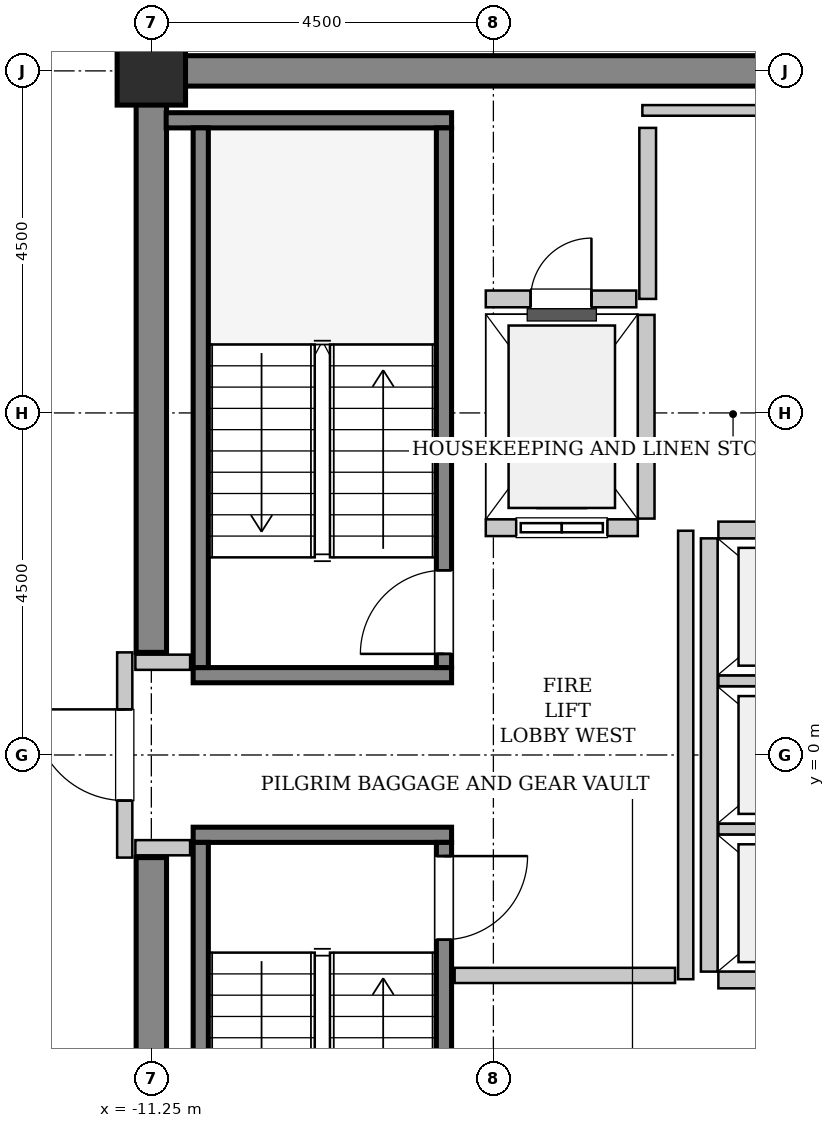
"""IFC4 building model, lengths in metres.
Left out: names, types, materials, properties, quantities, classifications, styles, units other than length and angle.
Written with IfcOpenShell. Run it as: python <this file> out.ifc"""

import sys

from ifc_helpers import new_model, si_unit, direction, frame, frame_2d, origin, origin_2d, place, context, subcontext, project, spatial, rectangle, extrude, source, transform, mapped, element, fill, save


model = new_model("IFC4")
c1 = context("Model", 3, precision=1e-05, world=origin(), true_north=direction((0.0, 1.0)))
c2 = subcontext(c1, "Body", "Model", "MODEL_VIEW")
j1 = project(units=[si_unit("LENGTHUNIT", "METRE"), si_unit("PLANEANGLEUNIT", "RADIAN")], contexts=[c1])
p1 = place(None, origin())
s1 = spatial("IfcSite", under=j1, at=p1, CompositionType="ELEMENT")
p2 = place(p1, origin())
s2 = spatial("IfcBuilding", under=s1, at=p2, CompositionType="ELEMENT")
p3 = place(p2, frame((0.0, 0.0, 322.4)))
s3 = spatial("IfcBuildingStorey", under=s2, at=p3, CompositionType="ELEMENT", Elevation=322.4)
m1 = source(origin(), c2, "Body", "SweptSolid", [
    extrude(rectangle(XDim=9.9, YDim=0.4, at=frame_2d((4.95, 0.0))), origin(), (0.0, 0.0, 1.0), 3.8),
])
p4 = place(p3, frame((-11.45, 9.0, 0.0), z_axis=(0.0, 0.0, 1.0), x_axis=(1.0, 0.0, 0.0)))
e1 = element("IfcWall", 1, at=p4, inside=s3, PredefinedType="SHEAR", context=c2, shape_type="MappedRepresentation", body=[
    mapped(m1, transform((0.0, 0.0, 0.0), x_axis=(1.0, 0.0, 0.0), y_axis=(0.0, 1.0, 0.0), z_axis=(0.0, 0.0, 1.0), scale=1.0)),
])
m2 = source(origin(), c2, "Body", "SweptSolid", [
    extrude(rectangle(XDim=7.45, YDim=0.4, at=frame_2d((3.725, 0.0))), origin(), (0.0, 0.0, 1.0), 3.8),
])
for number, where, z_axis, x_axis in (
    (2, (-11.25, -8.8, 0.0), (0.0, 0.0, 1.0), (0.0, 1.0, 0.0)),
    (3, (-11.25, 1.35, 0.0), (0.0, 0.0, 1.0), (0.0, 1.0, 0.0)),
):
    element("IfcWall", number, at=place(p3, frame(where, z_axis=z_axis, x_axis=x_axis)), inside=s3, PredefinedType="SHEAR", context=c2, shape_type="MappedRepresentation", body=[
        mapped(m2, transform((0.0, 0.0, 0.0), x_axis=(1.0, 0.0, 0.0), y_axis=(0.0, 1.0, 0.0), z_axis=(0.0, 0.0, 1.0), scale=1.0)),
    ])
m3 = source(origin(), c2, "Body", "SweptSolid", [
    extrude(rectangle(XDim=0.9, YDim=0.9, at=origin_2d()), origin(), (0.0, 0.0, 1.0), 3.8),
])
p5 = place(p3, frame((-11.25, 9.0, 0.0), z_axis=(0.0, 0.0, 1.0), x_axis=(1.0, 0.0, 0.0)))
e4 = element("IfcColumn", 4, at=p5, inside=s3, PredefinedType="COLUMN", context=c2, shape_type="MappedRepresentation", body=[
    mapped(m3, transform((0.0, 0.0, 0.0), x_axis=(1.0, 0.0, 0.0), y_axis=(0.0, 1.0, 0.0), z_axis=(0.0, 0.0, 1.0), scale=1.0)),
])
m4 = source(origin(), c2, "Body", "SweptSolid", [
    extrude(rectangle(XDim=3.4, YDim=0.2, at=frame_2d((1.7, 0.0))), origin(), (0.0, 0.0, 1.0), 3.8),
])
p6 = place(p3, frame((-7.3, 1.05, 0.0), z_axis=(0.0, 0.0, 1.0), x_axis=(-1.0, 0.0, 0.0)))
e5 = element("IfcWall", 5, at=p6, inside=s3, PredefinedType="SOLIDWALL", context=c2, shape_type="MappedRepresentation", body=[
    mapped(m4, transform((0.0, 0.0, 0.0), x_axis=(1.0, 0.0, 0.0), y_axis=(0.0, 1.0, 0.0), z_axis=(0.0, 0.0, 1.0), scale=1.0)),
])
m5 = source(origin(), c2, "Body", "SweptSolid", [
    extrude(rectangle(XDim=3.755, YDim=0.2, at=frame_2d((1.877, 0.0))), origin(), (0.0, 0.0, 1.0), 3.8),
])
p7 = place(p3, frame((-7.3, 8.35, 0.0), z_axis=(0.0, 0.0, 1.0), x_axis=(-1.0, 0.0, 0.0)))
e6 = element("IfcWall", 6, at=p7, inside=s3, PredefinedType="SOLIDWALL", context=c2, shape_type="MappedRepresentation", body=[
    mapped(m5, transform((0.0, 0.0, 0.0), x_axis=(1.0, 0.0, 0.0), y_axis=(0.0, 1.0, 0.0), z_axis=(0.0, 0.0, 1.0), scale=1.0)),
])
m6 = source(origin(), c2, "Body", "SweptSolid", [
    extrude(rectangle(XDim=7.1, YDim=0.2, at=frame_2d((3.55, 0.0))), origin(), (0.0, 0.0, 1.0), 3.8),
])
p8 = place(p3, frame((-7.4, 1.15, 0.0), z_axis=(0.0, 0.0, 1.0), x_axis=(0.0, 1.0, 0.0)))
e7 = element("IfcWall", 7, at=p8, inside=s3, PredefinedType="SOLIDWALL", context=c2, shape_type="MappedRepresentation", body=[
    mapped(m6, transform((0.0, 0.0, 0.0), x_axis=(1.0, 0.0, 0.0), y_axis=(0.0, 1.0, 0.0), z_axis=(0.0, 0.0, 1.0), scale=1.0)),
])
p9 = place(p8, frame((0.18, 0.0, 0.0)))
e8 = element("IfcOpeningElement", 8, at=p9, cuts=e7, PredefinedType="OPENING", context=c2, shape_type="SweptSolid", body=[
    extrude(rectangle(XDim=1.1, YDim=2.15, at=frame_2d((0.55, 1.075))), frame((0.0, 0.11, 0.0), z_axis=(0.0, -1.0, 0.0), x_axis=(1.0, 0.0, 0.0)), (0.0, 0.0, 1.0), 0.22),
])
p10 = place(p3, frame((-10.6, 1.15, 0.0), z_axis=(0.0, 0.0, 1.0), x_axis=(0.0, 1.0, 0.0)))
e9 = element("IfcWall", 9, at=p10, inside=s3, PredefinedType="SOLIDWALL", context=c2, shape_type="MappedRepresentation", body=[
    mapped(m6, transform((0.0, 0.0, 0.0), x_axis=(1.0, 0.0, 0.0), y_axis=(0.0, 1.0, 0.0), z_axis=(0.0, 0.0, 1.0), scale=1.0)),
])
p11 = place(p3, frame((-10.7, -1.05, 0.0), z_axis=(0.0, 0.0, 1.0), x_axis=(1.0, 0.0, 0.0)))
e10 = element("IfcWall", 10, at=p11, inside=s3, PredefinedType="SOLIDWALL", context=c2, shape_type="MappedRepresentation", body=[
    mapped(m4, transform((0.0, 0.0, 0.0), x_axis=(1.0, 0.0, 0.0), y_axis=(0.0, 1.0, 0.0), z_axis=(0.0, 0.0, 1.0), scale=1.0)),
])
p12 = place(p3, frame((-10.6, -1.15, 0.0), z_axis=(0.0, 0.0, 1.0), x_axis=(0.0, -1.0, 0.0)))
e11 = element("IfcWall", 11, at=p12, inside=s3, PredefinedType="SOLIDWALL", context=c2, shape_type="MappedRepresentation", body=[
    mapped(m6, transform((0.0, 0.0, 0.0), x_axis=(1.0, 0.0, 0.0), y_axis=(0.0, 1.0, 0.0), z_axis=(0.0, 0.0, 1.0), scale=1.0)),
])
p13 = place(p3, frame((-7.4, -1.15, 0.0), z_axis=(0.0, 0.0, 1.0), x_axis=(0.0, -1.0, 0.0)))
e12 = element("IfcWall", 12, at=p13, inside=s3, PredefinedType="SOLIDWALL", context=c2, shape_type="MappedRepresentation", body=[
    mapped(m6, transform((0.0, 0.0, 0.0), x_axis=(1.0, 0.0, 0.0), y_axis=(0.0, 1.0, 0.0), z_axis=(0.0, 0.0, 1.0), scale=1.0)),
])
p14 = place(p13, frame((0.18, 0.0, 0.0)))
e13 = element("IfcOpeningElement", 13, at=p14, cuts=e12, PredefinedType="OPENING", context=c2, shape_type="SweptSolid", body=[
    extrude(rectangle(XDim=1.1, YDim=2.15, at=frame_2d((0.55, 1.075))), frame((0.0, 0.11, 0.0), z_axis=(0.0, -1.0, 0.0), x_axis=(1.0, 0.0, 0.0)), (0.0, 0.0, 1.0), 0.22),
])
m7 = source(origin(), c2, "Body", "SweptSolid", [
    extrude(rectangle(XDim=2.0, YDim=0.22, at=frame_2d((1.0, 0.0))), origin(), (0.0, 0.0, 1.0), 3.535),
])
p15 = place(p3, frame((-6.85, 2.99, 0.0), z_axis=(0.0, 0.0, 1.0), x_axis=(1.0, 0.0, 0.0)))
e14 = element("IfcWall", 14, at=p15, inside=s3, PredefinedType="SOLIDWALL", context=c2, shape_type="MappedRepresentation", body=[
    mapped(m7, transform((0.0, 0.0, 0.0), x_axis=(1.0, 0.0, 0.0), y_axis=(0.0, 1.0, 0.0), z_axis=(0.0, 0.0, 1.0), scale=1.0)),
])
p16 = place(p15, frame((0.4, 0.0, 0.0)))
e15 = element("IfcOpeningElement", 15, at=p16, cuts=e14, PredefinedType="OPENING", context=c2, shape_type="SweptSolid", body=[
    extrude(rectangle(XDim=1.2, YDim=2.2, at=frame_2d((0.6, 1.1))), frame((0.0, 0.12, 0.0), z_axis=(0.0, -1.0, 0.0), x_axis=(1.0, 0.0, 0.0)), (0.0, 0.0, 1.0), 0.24),
])
m8 = source(origin(), c2, "Body", "SweptSolid", [
    extrude(rectangle(XDim=2.68, YDim=0.22, at=frame_2d((1.34, 0.0))), origin(), (0.0, 0.0, 1.0), 3.535),
])
p17 = place(p3, frame((-4.74, 3.11, 0.0), z_axis=(0.0, 0.0, 1.0), x_axis=(0.0, 1.0, 0.0)))
e16 = element("IfcWall", 16, at=p17, inside=s3, PredefinedType="SOLIDWALL", context=c2, shape_type="MappedRepresentation", body=[
    mapped(m8, transform((0.0, 0.0, 0.0), x_axis=(1.0, 0.0, 0.0), y_axis=(0.0, 1.0, 0.0), z_axis=(0.0, 0.0, 1.0), scale=1.0)),
])
m9 = source(origin(), c2, "Body", "SweptSolid", [
    extrude(rectangle(XDim=5.7, YDim=0.22, at=frame_2d((2.85, 0.0))), origin(), (0.0, 0.0, 1.0), 3.535),
])
p18 = place(p3, frame((-3.91, 2.85, 0.0), z_axis=(0.0, 0.0, 1.0), x_axis=(0.0, -1.0, 0.0)))
e17 = element("IfcWall", 17, at=p18, inside=s3, PredefinedType="SOLIDWALL", context=c2, shape_type="MappedRepresentation", body=[
    mapped(m9, transform((0.0, 0.0, 0.0), x_axis=(1.0, 0.0, 0.0), y_axis=(0.0, 1.0, 0.0), z_axis=(0.0, 0.0, 1.0), scale=1.0)),
])
m10 = source(origin(), c2, "Body", "SweptSolid", [
    extrude(rectangle(XDim=2.13, YDim=0.22, at=frame_2d((1.065, 0.0))), origin(), (0.0, 0.0, 1.0), 3.535),
])
p19 = place(p3, frame((-3.79, -2.96, 0.0), z_axis=(0.0, 0.0, 1.0), x_axis=(1.0, 0.0, 0.0)))
e18 = element("IfcWall", 18, at=p19, inside=s3, PredefinedType="SOLIDWALL", context=c2, shape_type="MappedRepresentation", body=[
    mapped(m10, transform((0.0, 0.0, 0.0), x_axis=(1.0, 0.0, 0.0), y_axis=(0.0, 1.0, 0.0), z_axis=(0.0, 0.0, 1.0), scale=1.0)),
])
m11 = source(origin(), c2, "Body", "SweptSolid", [
    extrude(rectangle(XDim=2.13, YDim=0.14, at=frame_2d((1.065, 0.0))), origin(), (0.0, 0.0, 1.0), 3.535),
])
for number, where, z_axis, x_axis in (
    (19, (-3.79, -0.975, 0.0), (0.0, 0.0, 1.0), (1.0, 0.0, 0.0)),
    (20, (-3.79, 0.975, 0.0), (0.0, 0.0, 1.0), (1.0, 0.0, 0.0)),
):
    element("IfcWall", number, at=place(p3, frame(where, z_axis=z_axis, x_axis=x_axis)), inside=s3, PredefinedType="PARTITIONING", context=c2, shape_type="MappedRepresentation", body=[
        mapped(m11, transform((0.0, 0.0, 0.0), x_axis=(1.0, 0.0, 0.0), y_axis=(0.0, 1.0, 0.0), z_axis=(0.0, 0.0, 1.0), scale=1.0)),
    ])
p20 = place(p3, frame((-1.66, 2.96, 0.0), z_axis=(0.0, 0.0, 1.0), x_axis=(-1.0, 0.0, 0.0)))
e21 = element("IfcWall", 21, at=p20, inside=s3, PredefinedType="SOLIDWALL", context=c2, shape_type="MappedRepresentation", body=[
    mapped(m10, transform((0.0, 0.0, 0.0), x_axis=(1.0, 0.0, 0.0), y_axis=(0.0, 1.0, 0.0), z_axis=(0.0, 0.0, 1.0), scale=1.0)),
])
m12 = source(origin(), c2, "Body", "SweptSolid", [
    extrude(rectangle(XDim=2.25, YDim=0.22, at=frame_2d((1.125, 0.0))), origin(), (0.0, 0.0, 1.0), 3.535),
])
p21 = place(p3, frame((-4.72, 6.0, 0.0), z_axis=(0.0, 0.0, 1.0), x_axis=(0.0, 1.0, 0.0)))
e22 = element("IfcWall", 22, at=p21, inside=s3, PredefinedType="SOLIDWALL", context=c2, shape_type="MappedRepresentation", body=[
    mapped(m12, transform((0.0, 0.0, 0.0), x_axis=(1.0, 0.0, 0.0), y_axis=(0.0, 1.0, 0.0), z_axis=(0.0, 0.0, 1.0), scale=1.0)),
])
m13 = source(origin(), c2, "Body", "SweptSolid", [
    extrude(rectangle(XDim=1.98, YDim=0.22, at=frame_2d((0.99, 0.0))), origin(), (0.0, 0.0, 1.0), 3.535),
])
p22 = place(p3, frame((-6.85, 6.0, 0.0), z_axis=(0.0, 0.0, 1.0), x_axis=(1.0, 0.0, 0.0)))
e23 = element("IfcWall", 23, at=p22, inside=s3, PredefinedType="SOLIDWALL", context=c2, shape_type="MappedRepresentation", body=[
    mapped(m13, transform((0.0, 0.0, 0.0), x_axis=(1.0, 0.0, 0.0), y_axis=(0.0, 1.0, 0.0), z_axis=(0.0, 0.0, 1.0), scale=1.0)),
])
p23 = place(p22, frame((0.59, 0.0, 0.0)))
e24 = element("IfcOpeningElement", 24, at=p23, cuts=e23, PredefinedType="OPENING", context=c2, shape_type="SweptSolid", body=[
    extrude(rectangle(XDim=0.8, YDim=2.0, at=frame_2d((0.4, 1.0))), frame((0.0, 0.12, 0.0), z_axis=(0.0, -1.0, 0.0), x_axis=(1.0, 0.0, 0.0)), (0.0, 0.0, 1.0), 0.24),
])
m14 = source(origin(), c2, "Body", "SweptSolid", [
    extrude(rectangle(XDim=2.7, YDim=0.2, at=frame_2d((1.35, 0.0))), origin(), (0.0, 0.0, 1.0), 2.625),
])
p24 = place(p3, frame((-11.6, -1.35, 0.0), z_axis=(0.0, 0.0, 1.0), x_axis=(0.0, 1.0, 0.0)))
e25 = element("IfcWall", 25, at=p24, inside=s3, PredefinedType="PARTITIONING", context=c2, shape_type="MappedRepresentation", body=[
    mapped(m14, transform((0.0, 0.0, 0.0), x_axis=(1.0, 0.0, 0.0), y_axis=(0.0, 1.0, 0.0), z_axis=(0.0, 0.0, 1.0), scale=1.0)),
])
p25 = place(p24, frame((0.75, 0.0, 0.0)))
e26 = element("IfcOpeningElement", 26, at=p25, cuts=e25, PredefinedType="OPENING", context=c2, shape_type="SweptSolid", body=[
    extrude(rectangle(XDim=1.2, YDim=2.15, at=frame_2d((0.6, 1.075))), frame((0.0, 0.11, 0.0), z_axis=(0.0, -1.0, 0.0), x_axis=(1.0, 0.0, 0.0)), (0.0, 0.0, 1.0), 0.22),
])
m15 = source(origin(), c2, "Body", "SweptSolid", [
    extrude(rectangle(XDim=5.9, YDim=0.2, at=frame_2d((2.95, 0.0))), origin(), (0.0, 0.0, 1.0), 3.535),
])
p26 = place(p3, frame((-4.22, -2.95, 0.0), z_axis=(0.0, 0.0, 1.0), x_axis=(0.0, 1.0, 0.0)))
e27 = element("IfcWall", 27, at=p26, inside=s3, PredefinedType="PARTITIONING", context=c2, shape_type="MappedRepresentation", body=[
    mapped(m15, transform((0.0, 0.0, 0.0), x_axis=(1.0, 0.0, 0.0), y_axis=(0.0, 1.0, 0.0), z_axis=(0.0, 0.0, 1.0), scale=1.0)),
])
m16 = source(origin(), c2, "Body", "SweptSolid", [
    extrude(rectangle(XDim=2.9, YDim=0.2, at=frame_2d((1.45, 0.0))), origin(), (0.0, 0.0, 1.0), 3.535),
])
p27 = place(p3, frame((-7.26, -2.9, 0.0), z_axis=(0.0, 0.0, 1.0), x_axis=(1.0, 0.0, 0.0)))
e28 = element("IfcWall", 28, at=p27, inside=s3, PredefinedType="PARTITIONING", context=c2, shape_type="MappedRepresentation", body=[
    mapped(m16, transform((0.0, 0.0, 0.0), x_axis=(1.0, 0.0, 0.0), y_axis=(0.0, 1.0, 0.0), z_axis=(0.0, 0.0, 1.0), scale=1.0)),
])
m17 = source(origin(), c2, "Body", "SweptSolid", [
    extrude(rectangle(XDim=0.72, YDim=0.2, at=frame_2d((0.36, 0.0))), origin(), (0.0, 0.0, 1.0), 3.535),
])
for number, where, z_axis, x_axis in (
    (29, (-11.46, 1.22, 0.0), (0.0, 0.0, 1.0), (1.0, 0.0, 0.0)),
    (30, (-11.46, -1.22, 0.0), (0.0, 0.0, 1.0), (1.0, 0.0, 0.0)),
):
    element("IfcWall", number, at=place(p3, frame(where, z_axis=z_axis, x_axis=x_axis)), inside=s3, PredefinedType="PARTITIONING", context=c2, shape_type="MappedRepresentation", body=[
        mapped(m17, transform((0.0, 0.0, 0.0), x_axis=(1.0, 0.0, 0.0), y_axis=(0.0, 1.0, 0.0), z_axis=(0.0, 0.0, 1.0), scale=1.0)),
    ])
m18 = source(origin(), c2, "Body", "SweptSolid", [
    extrude(rectangle(XDim=3.15, YDim=0.14, at=frame_2d((1.575, 0.0))), origin(), (0.0, 0.0, 1.0), 3.535),
])
p28 = place(p3, frame((-4.79, 8.48, 0.0), z_axis=(0.0, 0.0, 1.0), x_axis=(1.0, 0.0, 0.0)))
e31 = element("IfcWall", 31, at=p28, inside=s3, PredefinedType="PARTITIONING", context=c2, shape_type="MappedRepresentation", body=[
    mapped(m18, transform((0.0, 0.0, 0.0), x_axis=(1.0, 0.0, 0.0), y_axis=(0.0, 1.0, 0.0), z_axis=(0.0, 0.0, 1.0), scale=1.0)),
])
m19 = source(origin(), c2, "Body", "SweptSolid", [
    extrude(rectangle(XDim=1.1, YDim=2.15, at=frame_2d((0.55, 1.075))), frame((0.0, 0.025, 0.0), z_axis=(0.0, -1.0, 0.0), x_axis=(1.0, 0.0, 0.0)), (0.0, 0.0, 1.0), 0.05),
])
p29 = place(p9, origin())
e32 = element("IfcDoor", 32, at=p29, inside=s3, OperationType="SINGLE_SWING_LEFT", PredefinedType="DOOR", context=c2, shape_type="MappedRepresentation", body=[
    mapped(m19, transform((0.0, 0.0, 0.0), x_axis=(1.0, 0.0, 0.0), y_axis=(0.0, 1.0, 0.0), z_axis=(0.0, 0.0, 1.0), scale=1.0)),
])
fill(e8, e32)
p30 = place(p14, origin())
e33 = element("IfcDoor", 33, at=p30, inside=s3, OperationType="SINGLE_SWING_LEFT", PredefinedType="DOOR", context=c2, shape_type="MappedRepresentation", body=[
    mapped(m19, transform((0.0, 0.0, 0.0), x_axis=(1.0, 0.0, 0.0), y_axis=(0.0, 1.0, 0.0), z_axis=(0.0, 0.0, 1.0), scale=1.0)),
])
fill(e13, e33)
m20 = source(origin(), c2, "Body", "SweptSolid", [
    extrude(rectangle(XDim=1.2, YDim=2.2, at=frame_2d((0.6, 1.1))), frame((0.0, 0.025, 0.0), z_axis=(0.0, -1.0, 0.0), x_axis=(1.0, 0.0, 0.0)), (0.0, 0.0, 1.0), 0.05),
])
p31 = place(p16, origin())
e34 = element("IfcDoor", 34, at=p31, inside=s3, OperationType="SLIDING_TO_LEFT", PredefinedType="DOOR", context=c2, shape_type="MappedRepresentation", body=[
    mapped(m20, transform((0.0, 0.0, 0.0), x_axis=(1.0, 0.0, 0.0), y_axis=(0.0, 1.0, 0.0), z_axis=(0.0, 0.0, 1.0), scale=1.0)),
])
fill(e15, e34)
m21 = source(origin(), c2, "Body", "SweptSolid", [
    extrude(rectangle(XDim=0.8, YDim=2.0, at=frame_2d((0.4, 1.0))), frame((0.0, 0.025, 0.0), z_axis=(0.0, -1.0, 0.0), x_axis=(1.0, 0.0, 0.0)), (0.0, 0.0, 1.0), 0.05),
])
p32 = place(p23, origin())
e35 = element("IfcDoor", 35, at=p32, inside=s3, OperationType="SINGLE_SWING_RIGHT", PredefinedType="TRAPDOOR", context=c2, shape_type="MappedRepresentation", body=[
    mapped(m21, transform((0.0, 0.0, 0.0), x_axis=(1.0, 0.0, 0.0), y_axis=(0.0, 1.0, 0.0), z_axis=(0.0, 0.0, 1.0), scale=1.0)),
])
fill(e24, e35)
m22 = source(origin(), c2, "Body", "SweptSolid", [
    extrude(rectangle(XDim=1.2, YDim=2.15, at=frame_2d((0.6, 1.075))), frame((0.0, 0.025, 0.0), z_axis=(0.0, -1.0, 0.0), x_axis=(1.0, 0.0, 0.0)), (0.0, 0.0, 1.0), 0.05),
])
p33 = place(p25, origin())
e36 = element("IfcDoor", 36, at=p33, inside=s3, OperationType="SINGLE_SWING_RIGHT", PredefinedType="DOOR", context=c2, shape_type="MappedRepresentation", body=[
    mapped(m22, transform((0.0, 0.0, 0.0), x_axis=(1.0, 0.0, 0.0), y_axis=(0.0, 1.0, 0.0), z_axis=(0.0, 0.0, 1.0), scale=1.0)),
])
fill(e26, e36)
save(model, sys.argv[1])
